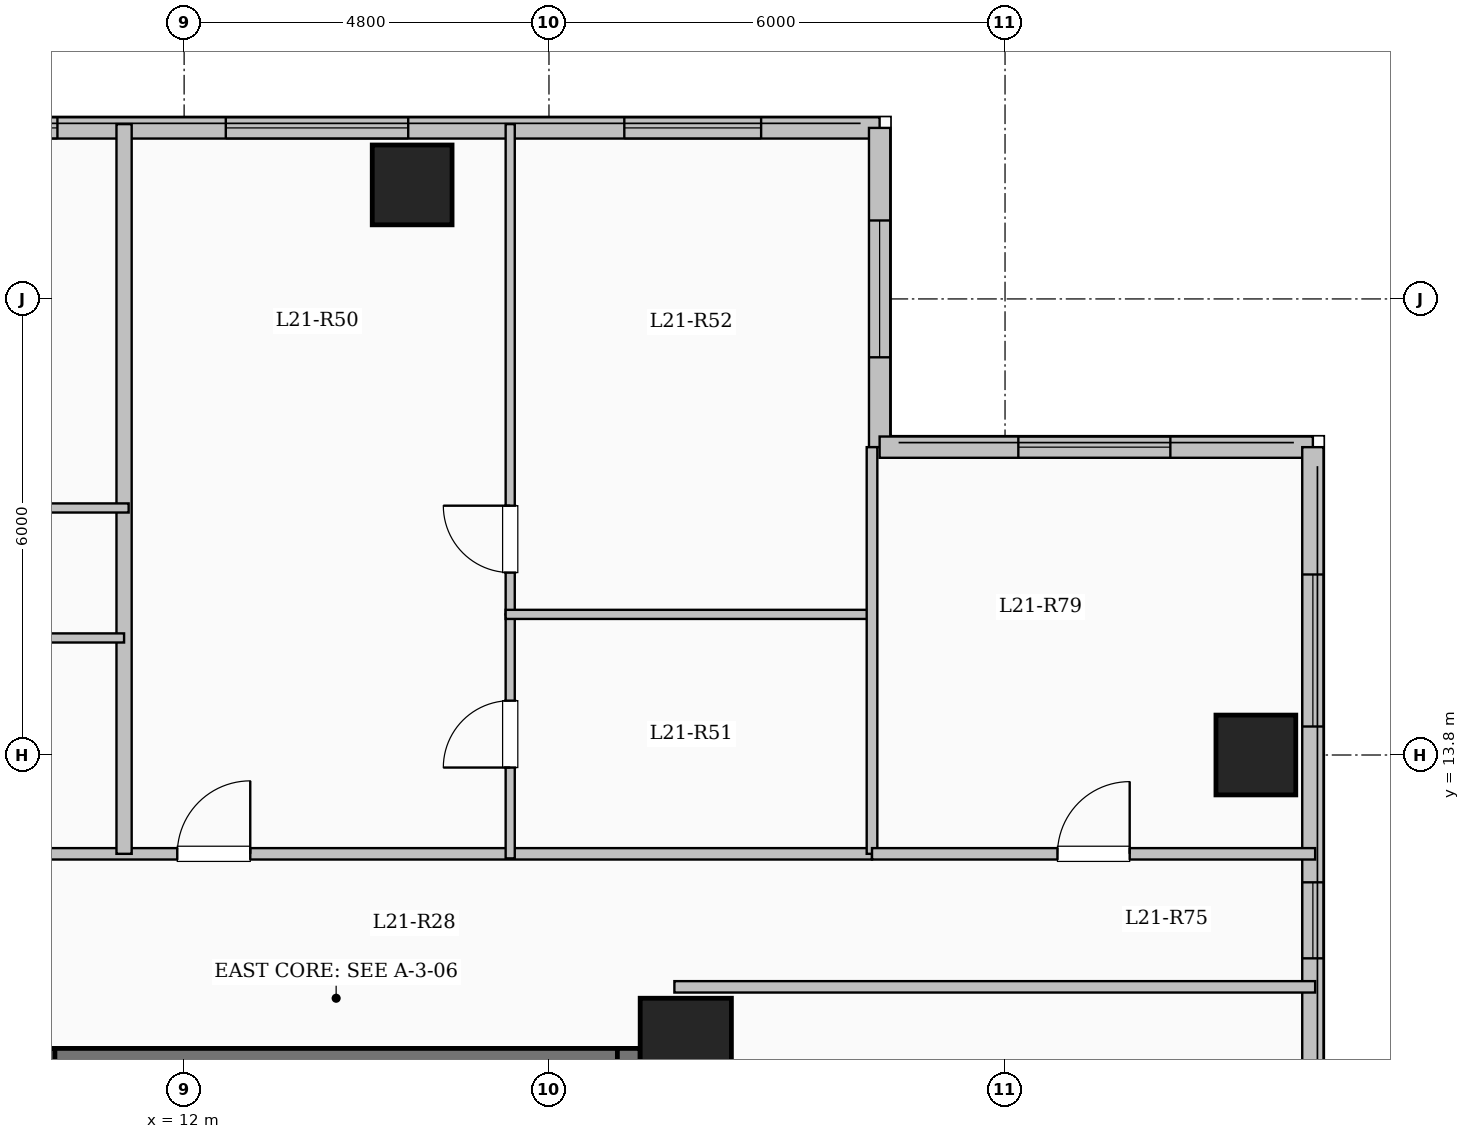
"""IFC4 building model, lengths in metres.
Left out: names, types, materials, properties, quantities, classifications, styles, units other than length and angle.
Written with IfcOpenShell. Run it as: python <this file> out.ifc"""

import sys

from ifc_helpers import new_model, si_unit, direction, frame, frame_2d, origin, origin_2d, place, context, subcontext, project, spatial, rectangle, extrude, element, fill, save


model = new_model("IFC4")
c1 = context("Model", 3, precision=1e-05, world=origin(), true_north=direction((0.0, 1.0)))
c2 = subcontext(c1, "Body", "Model", "MODEL_VIEW")
j1 = project(units=[si_unit("LENGTHUNIT", "METRE"), si_unit("PLANEANGLEUNIT", "RADIAN")], contexts=[c1])
p1 = place(None, origin())
s1 = spatial("IfcSite", under=j1, at=p1, CompositionType="ELEMENT")
p2 = place(p1, origin())
s2 = spatial("IfcBuilding", under=s1, at=p2, CompositionType="ELEMENT")
p3 = place(p2, frame((0.0, 0.0, 81.65)))
s3 = spatial("IfcBuildingStorey", under=s2, at=p3, CompositionType="ELEMENT", Elevation=81.65)
p4 = place(p3, frame((18.6, 10.0, 0.0), z_axis=(0.0, 0.0, 1.0), x_axis=(1.0, 0.0, 0.0)))
e1 = element("IfcColumn", 1, at=p4, inside=s3, PredefinedType="COLUMN", context=c2, shape_type="SweptSolid", body=[
    extrude(rectangle(XDim=1.2, YDim=1.2, at=origin_2d()), origin(), (0.0, 0.0, 1.0), 3.35),
])
for number, where, z_axis, x_axis in (
    (2, (15.0, 21.3, 0.0), (0.0, 0.0, 1.0), (1.0, 0.0, 0.0)),
    (3, (26.1, 13.8, 0.0), (0.0, 0.0, 1.0), (1.0, 0.0, 0.0)),
):
    element("IfcColumn", number, at=place(p3, frame(where, z_axis=z_axis, x_axis=x_axis)), inside=s3, PredefinedType="COLUMN", context=c2, shape_type="SweptSolid", body=[
        extrude(rectangle(XDim=1.05, YDim=1.05, at=origin_2d()), origin(), (0.0, 0.0, 1.0), 3.35),
    ])
p5 = place(p3, frame((7.35, 22.05, 0.0), z_axis=(0.0, 0.0, 1.0), x_axis=(1.0, 0.0, 0.0)))
e4 = element("IfcWall", 4, at=p5, inside=s3, PredefinedType="SOLIDWALL", context=c2, shape_type="SweptSolid", body=[
    extrude(rectangle(XDim=13.8, YDim=0.28, at=frame_2d((6.9, 0.0))), origin(), (0.0, 0.0, 1.0), 3.1),
])
p6 = place(p5, frame((1.483, 0.0, 0.9)))
e5 = element("IfcOpeningElement", 5, at=p6, cuts=e4, PredefinedType="OPENING", context=c2, shape_type="SweptSolid", body=[
    extrude(rectangle(XDim=1.5, YDim=1.65, at=frame_2d((0.75, 0.825))), frame((0.0, 0.15, 0.0), z_axis=(0.0, -1.0, 0.0), x_axis=(1.0, 0.0, 0.0)), (0.0, 0.0, 1.0), 0.3),
])
p7 = place(p5, frame((5.198, 0.0, 0.9)))
e6 = element("IfcOpeningElement", 6, at=p7, cuts=e4, PredefinedType="OPENING", context=c2, shape_type="SweptSolid", body=[
    extrude(rectangle(XDim=2.4, YDim=1.8, at=frame_2d((1.2, 0.9))), frame((0.0, 0.15, 0.0), z_axis=(0.0, -1.0, 0.0), x_axis=(1.0, 0.0, 0.0)), (0.0, 0.0, 1.0), 0.3),
])
p8 = place(p5, frame((10.441, 0.0, 0.9)))
e7 = element("IfcOpeningElement", 7, at=p8, cuts=e4, PredefinedType="OPENING", context=c2, shape_type="SweptSolid", body=[
    extrude(rectangle(XDim=1.8, YDim=1.65, at=frame_2d((0.9, 0.825))), frame((0.0, 0.15, 0.0), z_axis=(0.0, -1.0, 0.0), x_axis=(1.0, 0.0, 0.0)), (0.0, 0.0, 1.0), 0.3),
])
p9 = place(p3, frame((21.15, 22.05, 0.0), z_axis=(0.0, 0.0, 1.0), x_axis=(0.0, -1.0, 0.0)))
e8 = element("IfcWall", 8, at=p9, inside=s3, PredefinedType="SOLIDWALL", context=c2, shape_type="SweptSolid", body=[
    extrude(rectangle(XDim=4.2, YDim=0.28, at=frame_2d((2.1, 0.0))), origin(), (0.0, 0.0, 1.0), 3.1),
])
p10 = place(p9, frame((1.218, 0.0, 0.9)))
e9 = element("IfcOpeningElement", 9, at=p10, cuts=e8, PredefinedType="OPENING", context=c2, shape_type="SweptSolid", body=[
    extrude(rectangle(XDim=1.8, YDim=1.65, at=frame_2d((0.9, 0.825))), frame((0.0, 0.15, 0.0), z_axis=(0.0, -1.0, 0.0), x_axis=(1.0, 0.0, 0.0)), (0.0, 0.0, 1.0), 0.3),
])
p11 = place(p3, frame((21.15, 17.85, 0.0), z_axis=(0.0, 0.0, 1.0), x_axis=(1.0, 0.0, 0.0)))
e10 = element("IfcWall", 10, at=p11, inside=s3, PredefinedType="SOLIDWALL", context=c2, shape_type="SweptSolid", body=[
    extrude(rectangle(XDim=5.7, YDim=0.28, at=frame_2d((2.85, 0.0))), origin(), (0.0, 0.0, 1.0), 3.1),
])
p12 = place(p11, frame((1.825, 0.0, 0.9)))
e11 = element("IfcOpeningElement", 11, at=p12, cuts=e10, PredefinedType="OPENING", context=c2, shape_type="SweptSolid", body=[
    extrude(rectangle(XDim=2.0, YDim=1.7, at=frame_2d((1.0, 0.85))), frame((0.0, 0.15, 0.0), z_axis=(0.0, -1.0, 0.0), x_axis=(1.0, 0.0, 0.0)), (0.0, 0.0, 1.0), 0.3),
])
p13 = place(p3, frame((26.85, 17.85, 0.0), z_axis=(0.0, 0.0, 1.0), x_axis=(0.0, -1.0, 0.0)))
e12 = element("IfcWall", 12, at=p13, inside=s3, PredefinedType="SOLIDWALL", context=c2, shape_type="SweptSolid", body=[
    extrude(rectangle(XDim=35.7, YDim=0.28, at=frame_2d((17.85, 0.0))), origin(), (0.0, 0.0, 1.0), 3.1),
])
p14 = place(p13, frame((1.675, 0.0, 0.9)))
e13 = element("IfcOpeningElement", 13, at=p14, cuts=e12, PredefinedType="OPENING", context=c2, shape_type="SweptSolid", body=[
    extrude(rectangle(XDim=2.0, YDim=1.7, at=frame_2d((1.0, 0.85))), frame((0.0, 0.15, 0.0), z_axis=(0.0, -1.0, 0.0), x_axis=(1.0, 0.0, 0.0)), (0.0, 0.0, 1.0), 0.3),
])
p15 = place(p13, frame((5.725, 0.0, 0.95)))
e14 = element("IfcOpeningElement", 14, at=p15, cuts=e12, PredefinedType="OPENING", context=c2, shape_type="SweptSolid", body=[
    extrude(rectangle(XDim=1.0, YDim=1.5, at=frame_2d((0.5, 0.75))), frame((0.0, 0.15, 0.0), z_axis=(0.0, -1.0, 0.0), x_axis=(1.0, 0.0, 0.0)), (0.0, 0.0, 1.0), 0.3),
])
p16 = place(p13, frame((8.975, 0.0, 0.9)))
e15 = element("IfcOpeningElement", 15, at=p16, cuts=e12, PredefinedType="OPENING", context=c2, shape_type="SweptSolid", body=[
    extrude(rectangle(XDim=2.0, YDim=1.7, at=frame_2d((1.0, 0.85))), frame((0.0, 0.15, 0.0), z_axis=(0.0, -1.0, 0.0), x_axis=(1.0, 0.0, 0.0)), (0.0, 0.0, 1.0), 0.3),
])
p17 = place(p13, frame((13.725, 0.0, 0.9)))
e16 = element("IfcOpeningElement", 16, at=p17, cuts=e12, PredefinedType="OPENING", context=c2, shape_type="SweptSolid", body=[
    extrude(rectangle(XDim=1.8, YDim=1.65, at=frame_2d((0.9, 0.825))), frame((0.0, 0.15, 0.0), z_axis=(0.0, -1.0, 0.0), x_axis=(1.0, 0.0, 0.0)), (0.0, 0.0, 1.0), 0.3),
])
p18 = place(p13, frame((19.55, 0.0, 0.9)))
e17 = element("IfcOpeningElement", 17, at=p18, cuts=e12, PredefinedType="OPENING", context=c2, shape_type="SweptSolid", body=[
    extrude(rectangle(XDim=2.4, YDim=1.8, at=frame_2d((1.2, 0.9))), frame((0.0, 0.15, 0.0), z_axis=(0.0, -1.0, 0.0), x_axis=(1.0, 0.0, 0.0)), (0.0, 0.0, 1.0), 0.3),
])
p19 = place(p13, frame((25.857, 0.0, 0.9)))
e18 = element("IfcOpeningElement", 18, at=p19, cuts=e12, PredefinedType="OPENING", context=c2, shape_type="SweptSolid", body=[
    extrude(rectangle(XDim=1.5, YDim=1.65, at=frame_2d((0.75, 0.825))), frame((0.0, 0.15, 0.0), z_axis=(0.0, -1.0, 0.0), x_axis=(1.0, 0.0, 0.0)), (0.0, 0.0, 1.0), 0.3),
])
p20 = place(p13, frame((30.75, 0.0, 0.9)))
e19 = element("IfcOpeningElement", 19, at=p20, cuts=e12, PredefinedType="OPENING", context=c2, shape_type="SweptSolid", body=[
    extrude(rectangle(XDim=2.4, YDim=1.8, at=frame_2d((1.2, 0.9))), frame((0.0, 0.15, 0.0), z_axis=(0.0, -1.0, 0.0), x_axis=(1.0, 0.0, 0.0)), (0.0, 0.0, 1.0), 0.3),
])
p21 = place(p3, frame((10.0, 9.79, 0.0), z_axis=(0.0, 0.0, 1.0), x_axis=(1.0, 0.0, 0.0)))
e20 = element("IfcWall", 20, at=p21, inside=s3, PredefinedType="SHEAR", context=c2, shape_type="SweptSolid", body=[
    extrude(rectangle(XDim=8.0, YDim=0.3, at=frame_2d((4.0, 0.0))), origin(), (0.0, 0.0, 1.0), 3.35),
])
for number, where, z_axis, x_axis in (
    (21, (10.15, 6.35, 0.0), (0.0, 0.0, 1.0), (0.0, 1.0, 0.0)),
    (22, (17.85, 6.35, 0.0), (0.0, 0.0, 1.0), (0.0, 1.0, 0.0)),
):
    element("IfcWall", number, at=place(p3, frame(where, z_axis=z_axis, x_axis=x_axis)), inside=s3, PredefinedType="SHEAR", context=c2, shape_type="SweptSolid", body=[
        extrude(rectangle(XDim=3.59, YDim=0.3, at=frame_2d((1.795, 0.0))), origin(), (0.0, 0.0, 1.0), 3.35),
    ])
p22 = place(p3, frame((3.85, 12.5, 0.0), z_axis=(0.0, 0.0, 1.0), x_axis=(1.0, 0.0, 0.0)))
e23 = element("IfcWall", 23, at=p22, inside=s3, PredefinedType="PARTITIONING", context=c2, shape_type="SweptSolid", body=[
    extrude(rectangle(XDim=17.2, YDim=0.15, at=frame_2d((8.6, 0.0))), origin(), (0.0, 0.0, 1.0), 3.1),
])
p23 = place(p22, frame((1.3, 0.0, 0.0)))
e24 = element("IfcOpeningElement", 24, at=p23, cuts=e23, PredefinedType="OPENING", context=c2, shape_type="SweptSolid", body=[
    extrude(rectangle(XDim=0.96, YDim=2.15, at=frame_2d((0.48, 1.075))), frame((0.0, 0.085, 0.0), z_axis=(0.0, -1.0, 0.0), x_axis=(1.0, 0.0, 0.0)), (0.0, 0.0, 1.0), 0.17),
])
p24 = place(p22, frame((8.06, 0.0, 0.0)))
e25 = element("IfcOpeningElement", 25, at=p24, cuts=e23, PredefinedType="OPENING", context=c2, shape_type="SweptSolid", body=[
    extrude(rectangle(XDim=0.96, YDim=2.15, at=frame_2d((0.48, 1.075))), frame((0.0, 0.085, 0.0), z_axis=(0.0, -1.0, 0.0), x_axis=(1.0, 0.0, 0.0)), (0.0, 0.0, 1.0), 0.17),
])
p25 = place(p3, frame((11.21, 12.5, 0.0), z_axis=(0.0, 0.0, 1.0), x_axis=(0.0, 1.0, 0.0)))
e26 = element("IfcWall", 26, at=p25, inside=s3, PredefinedType="SOLIDWALL", context=c2, shape_type="SweptSolid", body=[
    extrude(rectangle(XDim=9.6, YDim=0.2, at=frame_2d((4.8, 0.0))), origin(), (0.0, 0.0, 1.0), 3.1),
])
p26 = place(p3, frame((7.925, 15.34, 0.0), z_axis=(0.0, 0.0, 1.0), x_axis=(1.0, 0.0, 0.0)))
e27 = element("IfcWall", 27, at=p26, inside=s3, PredefinedType="PARTITIONING", context=c2, shape_type="SweptSolid", body=[
    extrude(rectangle(XDim=3.285, YDim=0.12, at=frame_2d((1.643, 0.0))), origin(), (0.0, 0.0, 1.0), 3.1),
])
p27 = place(p26, frame((1.203, 0.0, 0.0)))
e28 = element("IfcOpeningElement", 28, at=p27, cuts=e27, PredefinedType="OPENING", context=c2, shape_type="SweptSolid", body=[
    extrude(rectangle(XDim=0.88, YDim=2.1, at=frame_2d((0.44, 1.05))), frame((0.0, 0.07, 0.0), z_axis=(0.0, -1.0, 0.0), x_axis=(1.0, 0.0, 0.0)), (0.0, 0.0, 1.0), 0.14),
])
p28 = place(p3, frame((4.766, 17.05, 0.0), z_axis=(0.0, 0.0, 1.0), x_axis=(1.0, 0.0, 0.0)))
e29 = element("IfcWall", 29, at=p28, inside=s3, PredefinedType="PARTITIONING", context=c2, shape_type="SweptSolid", body=[
    extrude(rectangle(XDim=6.504, YDim=0.12, at=frame_2d((3.252, 0.0))), origin(), (0.0, 0.0, 1.0), 3.1),
])
p29 = place(p28, frame((1.141, 0.0, 0.0)))
e30 = element("IfcOpeningElement", 30, at=p29, cuts=e29, PredefinedType="OPENING", context=c2, shape_type="SweptSolid", body=[
    extrude(rectangle(XDim=0.88, YDim=2.1, at=frame_2d((0.44, 1.05))), frame((0.0, 0.07, 0.0), z_axis=(0.0, -1.0, 0.0), x_axis=(1.0, 0.0, 0.0)), (0.0, 0.0, 1.0), 0.14),
])
p30 = place(p28, frame((4.303, 0.0, 0.0)))
e31 = element("IfcOpeningElement", 31, at=p30, cuts=e29, PredefinedType="OPENING", context=c2, shape_type="SweptSolid", body=[
    extrude(rectangle(XDim=0.88, YDim=2.1, at=frame_2d((0.44, 1.05))), frame((0.0, 0.07, 0.0), z_axis=(0.0, -1.0, 0.0), x_axis=(1.0, 0.0, 0.0)), (0.0, 0.0, 1.0), 0.14),
])
p31 = place(p3, frame((16.29, 12.44, 0.0), z_axis=(0.0, 0.0, 1.0), x_axis=(0.0, 1.0, 0.0)))
e32 = element("IfcWall", 32, at=p31, inside=s3, PredefinedType="PARTITIONING", context=c2, shape_type="SweptSolid", body=[
    extrude(rectangle(XDim=3.21, YDim=0.12, at=frame_2d((1.605, 0.0))), origin(), (0.0, 0.0, 1.0), 3.1),
])
p32 = place(p31, frame((1.195, 0.0, 0.0)))
e33 = element("IfcOpeningElement", 33, at=p32, cuts=e32, PredefinedType="OPENING", context=c2, shape_type="SweptSolid", body=[
    extrude(rectangle(XDim=0.88, YDim=2.1, at=frame_2d((0.44, 1.05))), frame((0.0, 0.07, 0.0), z_axis=(0.0, -1.0, 0.0), x_axis=(1.0, 0.0, 0.0)), (0.0, 0.0, 1.0), 0.14),
])
p33 = place(p3, frame((16.29, 15.65, 0.0), z_axis=(0.0, 0.0, 1.0), x_axis=(0.0, 1.0, 0.0)))
e34 = element("IfcWall", 34, at=p33, inside=s3, PredefinedType="PARTITIONING", context=c2, shape_type="SweptSolid", body=[
    extrude(rectangle(XDim=6.45, YDim=0.12, at=frame_2d((3.225, 0.0))), origin(), (0.0, 0.0, 1.0), 3.1),
])
p34 = place(p33, frame((0.55, 0.0, 0.0)))
e35 = element("IfcOpeningElement", 35, at=p34, cuts=e34, PredefinedType="OPENING", context=c2, shape_type="SweptSolid", body=[
    extrude(rectangle(XDim=0.88, YDim=2.1, at=frame_2d((0.44, 1.05))), frame((0.0, 0.07, 0.0), z_axis=(0.0, -1.0, 0.0), x_axis=(1.0, 0.0, 0.0)), (0.0, 0.0, 1.0), 0.14),
])
p35 = place(p3, frame((16.23, 15.65, 0.0), z_axis=(0.0, 0.0, 1.0), x_axis=(1.0, 0.0, 0.0)))
e36 = element("IfcWall", 36, at=p35, inside=s3, PredefinedType="PARTITIONING", context=c2, shape_type="SweptSolid", body=[
    extrude(rectangle(XDim=4.88, YDim=0.12, at=frame_2d((2.44, 0.0))), origin(), (0.0, 0.0, 1.0), 3.1),
])
p36 = place(p3, frame((18.45, 10.75, 0.0), z_axis=(0.0, 0.0, 1.0), x_axis=(1.0, 0.0, 0.0)))
e37 = element("IfcWall", 37, at=p36, inside=s3, PredefinedType="PARTITIONING", context=c2, shape_type="SweptSolid", body=[
    extrude(rectangle(XDim=8.43, YDim=0.15, at=frame_2d((4.215, 0.0))), origin(), (0.0, 0.0, 1.0), 3.1),
])
p37 = place(p3, frame((21.05, 12.5, 0.0), z_axis=(0.0, 0.0, 1.0), x_axis=(0.0, 1.0, 0.0)))
e38 = element("IfcWall", 38, at=p37, inside=s3, PredefinedType="PARTITIONING", context=c2, shape_type="SweptSolid", body=[
    extrude(rectangle(XDim=5.35, YDim=0.14, at=frame_2d((2.675, 0.0))), origin(), (0.0, 0.0, 1.0), 3.1),
])
p38 = place(p3, frame((21.05, 12.5, 0.0), z_axis=(0.0, 0.0, 1.0), x_axis=(1.0, 0.0, 0.0)))
e39 = element("IfcWall", 39, at=p38, inside=s3, PredefinedType="PARTITIONING", context=c2, shape_type="SweptSolid", body=[
    extrude(rectangle(XDim=5.83, YDim=0.15, at=frame_2d((2.915, 0.0))), origin(), (0.0, 0.0, 1.0), 3.1),
])
p39 = place(p38, frame((2.44, 0.0, 0.0)))
e40 = element("IfcOpeningElement", 40, at=p39, cuts=e39, PredefinedType="OPENING", context=c2, shape_type="SweptSolid", body=[
    extrude(rectangle(XDim=0.95, YDim=2.15, at=frame_2d((0.475, 1.075))), frame((0.0, 0.085, 0.0), z_axis=(0.0, -1.0, 0.0), x_axis=(1.0, 0.0, 0.0)), (0.0, 0.0, 1.0), 0.17),
])
p40 = place(p6, origin())
e41 = element("IfcWindow", 41, at=p40, inside=s3, PartitioningType="SINGLE_PANEL", PredefinedType="WINDOW", context=c2, shape_type="SweptSolid", body=[
    extrude(rectangle(XDim=1.5, YDim=1.65, at=frame_2d((0.75, 0.825))), frame((0.0, 0.03, 0.0), z_axis=(0.0, -1.0, 0.0), x_axis=(1.0, 0.0, 0.0)), (0.0, 0.0, 1.0), 0.06),
])
fill(e5, e41)
p41 = place(p7, origin())
e42 = element("IfcWindow", 42, at=p41, inside=s3, PartitioningType="SINGLE_PANEL", PredefinedType="WINDOW", context=c2, shape_type="SweptSolid", body=[
    extrude(rectangle(XDim=2.4, YDim=1.8, at=frame_2d((1.2, 0.9))), frame((0.0, 0.03, 0.0), z_axis=(0.0, -1.0, 0.0), x_axis=(1.0, 0.0, 0.0)), (0.0, 0.0, 1.0), 0.06),
])
fill(e6, e42)
p42 = place(p8, origin())
e43 = element("IfcWindow", 43, at=p42, inside=s3, PartitioningType="SINGLE_PANEL", PredefinedType="WINDOW", context=c2, shape_type="SweptSolid", body=[
    extrude(rectangle(XDim=1.8, YDim=1.65, at=frame_2d((0.9, 0.825))), frame((0.0, 0.03, 0.0), z_axis=(0.0, -1.0, 0.0), x_axis=(1.0, 0.0, 0.0)), (0.0, 0.0, 1.0), 0.06),
])
fill(e7, e43)
p43 = place(p10, origin())
e44 = element("IfcWindow", 44, at=p43, inside=s3, PartitioningType="SINGLE_PANEL", PredefinedType="WINDOW", context=c2, shape_type="SweptSolid", body=[
    extrude(rectangle(XDim=1.8, YDim=1.65, at=frame_2d((0.9, 0.825))), frame((0.0, 0.03, 0.0), z_axis=(0.0, -1.0, 0.0), x_axis=(1.0, 0.0, 0.0)), (0.0, 0.0, 1.0), 0.06),
])
fill(e9, e44)
p44 = place(p12, origin())
e45 = element("IfcWindow", 45, at=p44, inside=s3, PartitioningType="SINGLE_PANEL", PredefinedType="WINDOW", context=c2, shape_type="SweptSolid", body=[
    extrude(rectangle(XDim=2.0, YDim=1.7, at=frame_2d((1.0, 0.85))), frame((0.0, 0.03, 0.0), z_axis=(0.0, -1.0, 0.0), x_axis=(1.0, 0.0, 0.0)), (0.0, 0.0, 1.0), 0.06),
])
fill(e11, e45)
p45 = place(p14, origin())
e46 = element("IfcWindow", 46, at=p45, inside=s3, PartitioningType="SINGLE_PANEL", PredefinedType="WINDOW", context=c2, shape_type="SweptSolid", body=[
    extrude(rectangle(XDim=2.0, YDim=1.7, at=frame_2d((1.0, 0.85))), frame((0.0, 0.03, 0.0), z_axis=(0.0, -1.0, 0.0), x_axis=(1.0, 0.0, 0.0)), (0.0, 0.0, 1.0), 0.06),
])
fill(e13, e46)
p46 = place(p15, origin())
e47 = element("IfcWindow", 47, at=p46, inside=s3, PartitioningType="SINGLE_PANEL", PredefinedType="WINDOW", context=c2, shape_type="SweptSolid", body=[
    extrude(rectangle(XDim=1.0, YDim=1.5, at=frame_2d((0.5, 0.75))), frame((0.0, 0.03, 0.0), z_axis=(0.0, -1.0, 0.0), x_axis=(1.0, 0.0, 0.0)), (0.0, 0.0, 1.0), 0.06),
])
fill(e14, e47)
p47 = place(p24, origin())
e48 = element("IfcDoor", 48, at=p47, inside=s3, OperationType="SINGLE_SWING_RIGHT", PredefinedType="DOOR", context=c2, shape_type="SweptSolid", body=[
    extrude(rectangle(XDim=0.96, YDim=2.15, at=frame_2d((0.48, 1.075))), frame((0.0, 0.025, 0.0), z_axis=(0.0, -1.0, 0.0), x_axis=(1.0, 0.0, 0.0)), (0.0, 0.0, 1.0), 0.05),
])
fill(e25, e48)
p48 = place(p32, origin())
e49 = element("IfcDoor", 49, at=p48, inside=s3, OperationType="SINGLE_SWING_LEFT", PredefinedType="DOOR", context=c2, shape_type="SweptSolid", body=[
    extrude(rectangle(XDim=0.88, YDim=2.1, at=frame_2d((0.44, 1.05))), frame((0.0, 0.025, 0.0), z_axis=(0.0, -1.0, 0.0), x_axis=(1.0, 0.0, 0.0)), (0.0, 0.0, 1.0), 0.05),
])
fill(e33, e49)
p49 = place(p34, origin())
e50 = element("IfcDoor", 50, at=p49, inside=s3, OperationType="SINGLE_SWING_RIGHT", PredefinedType="DOOR", context=c2, shape_type="SweptSolid", body=[
    extrude(rectangle(XDim=0.88, YDim=2.1, at=frame_2d((0.44, 1.05))), frame((0.0, 0.025, 0.0), z_axis=(0.0, -1.0, 0.0), x_axis=(1.0, 0.0, 0.0)), (0.0, 0.0, 1.0), 0.05),
])
fill(e35, e50)
p50 = place(p39, origin())
e51 = element("IfcDoor", 51, at=p50, inside=s3, OperationType="SINGLE_SWING_RIGHT", PredefinedType="DOOR", context=c2, shape_type="SweptSolid", body=[
    extrude(rectangle(XDim=0.95, YDim=2.15, at=frame_2d((0.475, 1.075))), frame((0.0, 0.025, 0.0), z_axis=(0.0, -1.0, 0.0), x_axis=(1.0, 0.0, 0.0)), (0.0, 0.0, 1.0), 0.05),
])
fill(e40, e51)
save(model, sys.argv[1])
